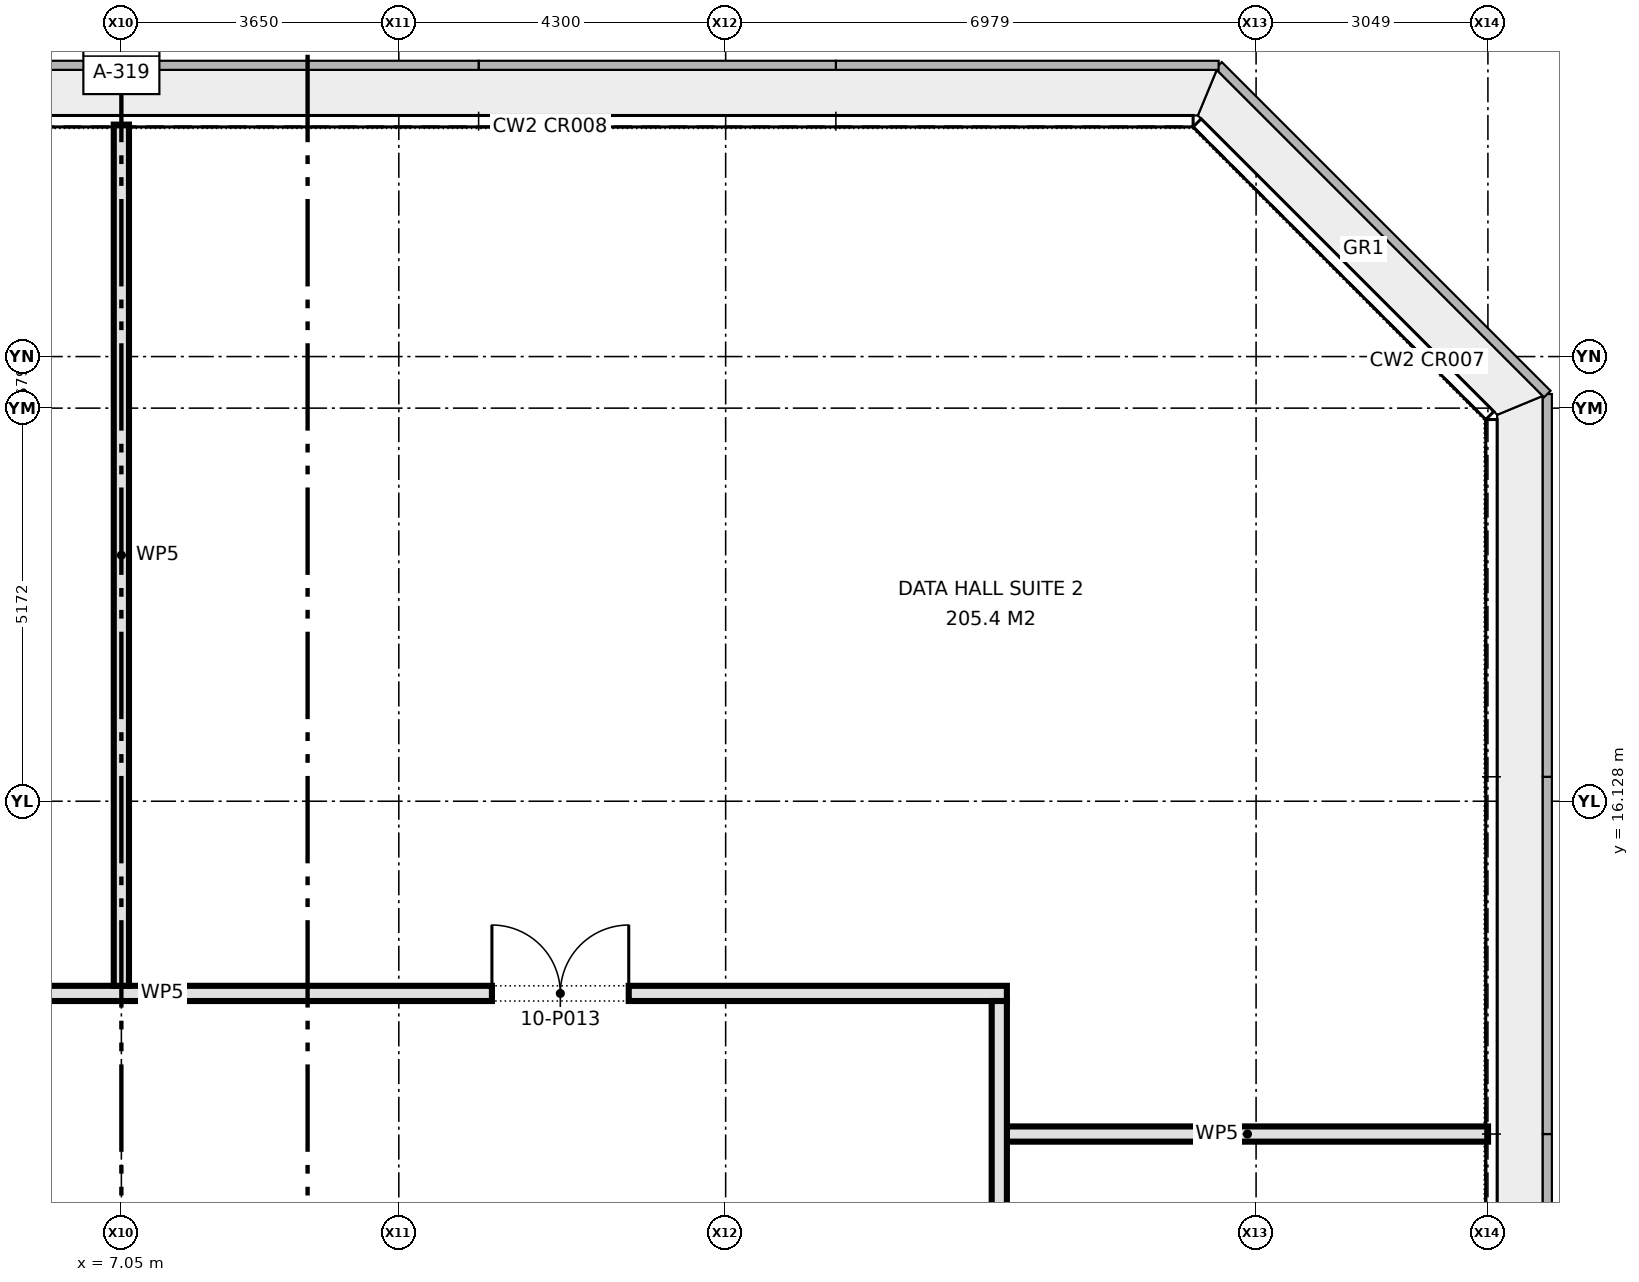
"""IFC4 building model, lengths in metres.
Left out: names, types, materials, properties, quantities, classifications, styles, units other than length and angle.
Written with IfcOpenShell. Run it as: python <this file> out.ifc"""

import sys

from ifc_helpers import new_model, si_unit, direction, frame, frame_2d, origin, place, context, subcontext, project, spatial, rectangle, extrude, element, fill, save


model = new_model("IFC4")
c1 = context("Model", 3, precision=1e-05, world=origin(), true_north=direction((0.0, 1.0)))
c2 = subcontext(c1, "Body", "Model", "MODEL_VIEW")
j1 = project(units=[si_unit("LENGTHUNIT", "METRE"), si_unit("PLANEANGLEUNIT", "RADIAN")], contexts=[c1])
p1 = place(None, origin())
s1 = spatial("IfcSite", under=j1, at=p1, CompositionType="ELEMENT")
p2 = place(p1, origin())
s2 = spatial("IfcBuilding", under=s1, at=p2, CompositionType="ELEMENT")
p3 = place(p2, frame((0.0, 0.0, 44.9)))
s3 = spatial("IfcBuildingStorey", under=s2, at=p3, CompositionType="ELEMENT", Elevation=44.9)
p4 = place(p3, frame((18.7, 11.75, 0.0), z_axis=(0.0, 0.0, 1.0), x_axis=(1.0, 0.0, 0.0)))
e1 = element("IfcWall", 1, at=p4, inside=s3, PredefinedType="PARTITIONING", context=c2, shape_type="SweptSolid", body=[
    extrude(rectangle(XDim=6.33, YDim=0.2, at=frame_2d((3.165, 0.0))), origin(), (0.0, 0.0, 1.0), 4.575),
])
p5 = place(p3, frame((-18.7, 13.6, 0.0), z_axis=(0.0, 0.0, 1.0), x_axis=(1.0, 0.0, 0.0)))
e2 = element("IfcWall", 2, at=p5, inside=s3, PredefinedType="PARTITIONING", context=c2, shape_type="SweptSolid", body=[
    extrude(rectangle(XDim=37.4, YDim=0.2, at=frame_2d((18.7, 0.0))), origin(), (0.0, 0.0, 1.0), 4.575),
])
p6 = place(p5, frame((4.125, 0.0, 0.0)))
e3 = element("IfcOpeningElement", 3, at=p6, cuts=e2, PredefinedType="OPENING", context=c2, shape_type="SweptSolid", body=[
    extrude(rectangle(XDim=1.8, YDim=2.1, at=frame_2d((0.9, 1.05))), frame((0.0, 0.11, 0.0), z_axis=(0.0, -1.0, 0.0), x_axis=(1.0, 0.0, 0.0)), (0.0, 0.0, 1.0), 0.22),
])
p7 = place(p5, frame((1.1, 0.0, 0.0)))
e4 = element("IfcOpeningElement", 4, at=p7, cuts=e2, PredefinedType="OPENING", context=c2, shape_type="SweptSolid", body=[
    extrude(rectangle(XDim=1.0, YDim=2.1, at=frame_2d((0.5, 1.05))), frame((0.0, 0.11, 0.0), z_axis=(0.0, -1.0, 0.0), x_axis=(1.0, 0.0, 0.0)), (0.0, 0.0, 1.0), 0.22),
])
p8 = place(p5, frame((10.75, 0.0, 0.0)))
e5 = element("IfcOpeningElement", 5, at=p8, cuts=e2, PredefinedType="OPENING", context=c2, shape_type="SweptSolid", body=[
    extrude(rectangle(XDim=1.8, YDim=2.1, at=frame_2d((0.9, 1.05))), frame((0.0, 0.11, 0.0), z_axis=(0.0, -1.0, 0.0), x_axis=(1.0, 0.0, 0.0)), (0.0, 0.0, 1.0), 0.22),
])
p9 = place(p5, frame((20.15, 0.0, 0.0)))
e6 = element("IfcOpeningElement", 6, at=p9, cuts=e2, PredefinedType="OPENING", context=c2, shape_type="SweptSolid", body=[
    extrude(rectangle(XDim=1.8, YDim=2.1, at=frame_2d((0.9, 1.05))), frame((0.0, 0.11, 0.0), z_axis=(0.0, -1.0, 0.0), x_axis=(1.0, 0.0, 0.0)), (0.0, 0.0, 1.0), 0.22),
])
p10 = place(p5, frame((30.625, 0.0, 0.0)))
e7 = element("IfcOpeningElement", 7, at=p10, cuts=e2, PredefinedType="OPENING", context=c2, shape_type="SweptSolid", body=[
    extrude(rectangle(XDim=1.8, YDim=2.1, at=frame_2d((0.9, 1.05))), frame((0.0, 0.11, 0.0), z_axis=(0.0, -1.0, 0.0), x_axis=(1.0, 0.0, 0.0)), (0.0, 0.0, 1.0), 0.22),
])
p11 = place(p3, frame((18.6, -13.5, 0.0), z_axis=(0.0, 0.0, 1.0), x_axis=(0.0, 1.0, 0.0)))
e8 = element("IfcWall", 8, at=p11, inside=s3, PredefinedType="PARTITIONING", context=c2, shape_type="SweptSolid", body=[
    extrude(rectangle(XDim=27.0, YDim=0.2, at=frame_2d((13.5, 0.0))), origin(), (0.0, 0.0, 1.0), 4.575),
])
p12 = place(p11, frame((5.55, 0.0, 0.0)))
e9 = element("IfcOpeningElement", 9, at=p12, cuts=e8, PredefinedType="OPENING", context=c2, shape_type="SweptSolid", body=[
    extrude(rectangle(XDim=1.8, YDim=2.1, at=frame_2d((0.9, 1.05))), frame((0.0, 0.11, 0.0), z_axis=(0.0, -1.0, 0.0), x_axis=(1.0, 0.0, 0.0)), (0.0, 0.0, 1.0), 0.22),
])
p13 = place(p11, frame((21.7, 0.0, 0.0)))
e10 = element("IfcOpeningElement", 10, at=p13, cuts=e8, PredefinedType="OPENING", context=c2, shape_type="SweptSolid", body=[
    extrude(rectangle(XDim=1.2, YDim=2.1, at=frame_2d((0.6, 1.05))), frame((0.0, 0.11, 0.0), z_axis=(0.0, -1.0, 0.0), x_axis=(1.0, 0.0, 0.0)), (0.0, 0.0, 1.0), 0.22),
])
p14 = place(p11, frame((12.15, 0.0, 0.0)))
e11 = element("IfcOpeningElement", 11, at=p14, cuts=e8, PredefinedType="OPENING", context=c2, shape_type="SweptSolid", body=[
    extrude(rectangle(XDim=1.0, YDim=2.1, at=frame_2d((0.5, 1.05))), frame((0.0, 0.11, 0.0), z_axis=(0.0, -1.0, 0.0), x_axis=(1.0, 0.0, 0.0)), (0.0, 0.0, 1.0), 0.22),
])
p15 = place(p11, frame((15.15, 0.0, 0.0)))
e12 = element("IfcOpeningElement", 12, at=p15, cuts=e8, PredefinedType="OPENING", context=c2, shape_type="SweptSolid", body=[
    extrude(rectangle(XDim=1.0, YDim=2.1, at=frame_2d((0.5, 1.05))), frame((0.0, 0.11, 0.0), z_axis=(0.0, -1.0, 0.0), x_axis=(1.0, 0.0, 0.0)), (0.0, 0.0, 1.0), 0.22),
])
p16 = place(p11, frame((17.75, 0.0, 0.0)))
e13 = element("IfcOpeningElement", 13, at=p16, cuts=e8, PredefinedType="OPENING", context=c2, shape_type="SweptSolid", body=[
    extrude(rectangle(XDim=1.0, YDim=2.1, at=frame_2d((0.5, 1.05))), frame((0.0, 0.11, 0.0), z_axis=(0.0, -1.0, 0.0), x_axis=(1.0, 0.0, 0.0)), (0.0, 0.0, 1.0), 0.22),
])
p17 = place(p3, frame((7.05, 13.7, 0.0), z_axis=(0.0, 0.0, 1.0), x_axis=(0.0, 1.0, 0.0)))
e14 = element("IfcWall", 14, at=p17, inside=s3, PredefinedType="PARTITIONING", context=c2, shape_type="SweptSolid", body=[
    extrude(rectangle(XDim=11.33, YDim=0.2, at=frame_2d((5.665, 0.0))), origin(), (0.0, 0.0, 1.0), 4.575),
])
p18 = place(p10, origin())
e15 = element("IfcDoor", 15, at=p18, inside=s3, OperationType="DOUBLE_DOOR_SINGLE_SWING", PredefinedType="DOOR", context=c2, shape_type="SweptSolid", body=[
    extrude(rectangle(XDim=1.8, YDim=2.1, at=frame_2d((0.9, 1.05))), frame((0.0, 0.025, 0.0), z_axis=(0.0, -1.0, 0.0), x_axis=(1.0, 0.0, 0.0)), (0.0, 0.0, 1.0), 0.05),
])
fill(e7, e15)
save(model, sys.argv[1])
